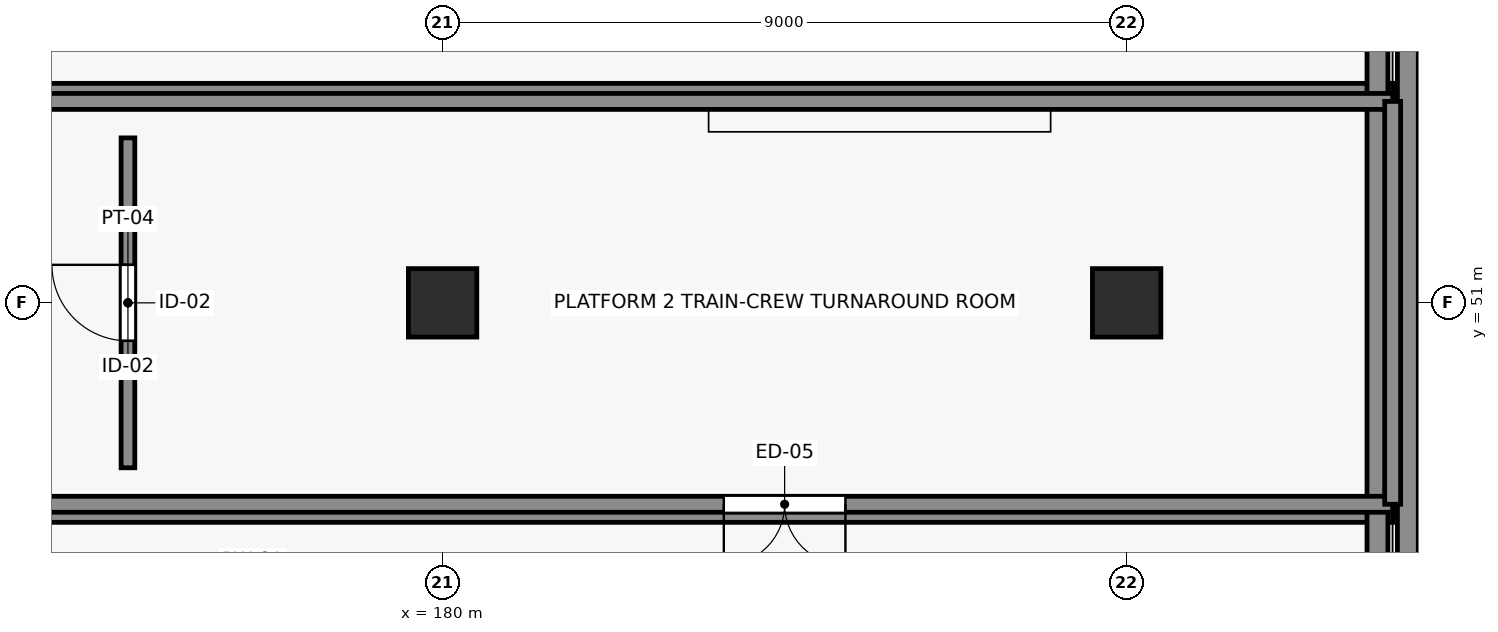
"""IFC4 building model, lengths in metres.
Left out: names, types, materials, properties, quantities, classifications, styles, units other than length and angle.
Written with IfcOpenShell. Run it as: python <this file> out.ifc"""

import sys

from ifc_helpers import new_model, si_unit, direction, frame, frame_2d, origin, origin_2d, place, context, subcontext, project, spatial, rectangle, extrude, element, fill, save


model = new_model("IFC4")
c1 = context("Model", 3, precision=1e-05, world=origin(), true_north=direction((0.0, 1.0)))
c2 = subcontext(c1, "Body", "Model", "MODEL_VIEW")
j1 = project(units=[si_unit("LENGTHUNIT", "METRE"), si_unit("PLANEANGLEUNIT", "RADIAN")], contexts=[c1])
p1 = place(None, origin())
s1 = spatial("IfcSite", under=j1, at=p1, CompositionType="ELEMENT")
p2 = place(p1, origin())
s2 = spatial("IfcBuilding", under=s1, at=p2, CompositionType="ELEMENT")
p3 = place(p2, origin())
s3 = spatial("IfcBuildingStorey", under=s2, at=p3, CompositionType="ELEMENT", Elevation=0.0)
for number, where, z_axis, x_axis in (
    (1, (141.5, 48.25, 0.0), (0.0, 0.0, 1.0), (1.0, 0.0, 0.0)),
    (2, (141.5, 53.75, 0.0), (0.0, 0.0, 1.0), (1.0, 0.0, 0.0)),
):
    element("IfcWall", number, at=place(p3, frame(where, z_axis=z_axis, x_axis=x_axis)), inside=s3, PredefinedType="SOLIDWALL", context=c2, shape_type="SweptSolid", body=[
        extrude(rectangle(XDim=51.0, YDim=0.275, at=frame_2d((25.5, 0.0))), origin(), (0.0, 0.0, 1.0), 0.675),
    ])
for number, where, z_axis, x_axis in (
    (3, (192.3, 47.25, 0.0), (0.0, 0.0, 1.0), (0.0, 1.0, 0.0)),
    (4, (192.7, 47.25, 0.0), (0.0, 0.0, 1.0), (0.0, 1.0, 0.0)),
):
    element("IfcWall", number, at=place(p3, frame(where, z_axis=z_axis, x_axis=x_axis)), inside=s3, PredefinedType="SOLIDWALL", context=c2, shape_type="SweptSolid", body=[
        extrude(rectangle(XDim=7.5, YDim=0.275, at=frame_2d((3.75, 0.0))), origin(), (0.0, 0.0, 1.0), 0.675),
    ])
for number, where, z_axis, x_axis in (
    (5, (180.0, 51.0, 0.0), (0.0, 0.0, 1.0), (1.0, 0.0, 0.0)),
    (6, (189.0, 51.0, 0.0), (0.0, 0.0, 1.0), (1.0, 0.0, 0.0)),
):
    element("IfcColumn", number, at=place(p3, frame(where, z_axis=z_axis, x_axis=x_axis)), inside=s3, PredefinedType="COLUMN", context=c2, shape_type="SweptSolid", body=[
        extrude(rectangle(XDim=0.9, YDim=0.9, at=origin_2d()), origin(), (0.0, 0.0, 1.0), 4.8),
    ])
p4 = place(p3, frame((192.5, 48.35, 0.915), z_axis=(0.0, 0.0, 1.0), x_axis=(-1.0, 0.0, 0.0)))
e7 = element("IfcWall", 7, at=p4, inside=s3, PredefinedType="SOLIDWALL", context=c2, shape_type="SweptSolid", body=[
    extrude(rectangle(XDim=51.0, YDim=0.21, at=frame_2d((25.5, 0.0))), origin(), (0.0, 0.0, 1.0), 3.185),
])
p5 = place(p4, frame((25.2, 0.0, 0.0)))
e8 = element("IfcOpeningElement", 8, at=p5, cuts=e7, PredefinedType="OPENING", context=c2, shape_type="SweptSolid", body=[
    extrude(rectangle(XDim=1.6, YDim=2.3, at=frame_2d((0.8, 1.15))), frame((0.0, 0.115, 0.0), z_axis=(0.0, -1.0, 0.0), x_axis=(1.0, 0.0, 0.0)), (0.0, 0.0, 1.0), 0.23),
])
p6 = place(p4, frame((7.2, 0.0, 0.0)))
e9 = element("IfcOpeningElement", 9, at=p6, cuts=e7, PredefinedType="OPENING", context=c2, shape_type="SweptSolid", body=[
    extrude(rectangle(XDim=1.6, YDim=2.3, at=frame_2d((0.8, 1.15))), frame((0.0, 0.115, 0.0), z_axis=(0.0, -1.0, 0.0), x_axis=(1.0, 0.0, 0.0)), (0.0, 0.0, 1.0), 0.23),
])
p7 = place(p4, frame((36.0, 0.0, 0.9)))
e10 = element("IfcOpeningElement", 10, at=p7, cuts=e7, PredefinedType="OPENING", context=c2, shape_type="SweptSolid", body=[
    extrude(rectangle(XDim=4.2, YDim=1.5, at=frame_2d((2.1, 0.75))), frame((0.0, 0.115, 0.0), z_axis=(0.0, -1.0, 0.0), x_axis=(1.0, 0.0, 0.0)), (0.0, 0.0, 1.0), 0.23),
])
p8 = place(p3, frame((141.5, 53.65, 0.915), z_axis=(0.0, 0.0, 1.0), x_axis=(1.0, 0.0, 0.0)))
e11 = element("IfcWall", 11, at=p8, inside=s3, PredefinedType="SOLIDWALL", context=c2, shape_type="SweptSolid", body=[
    extrude(rectangle(XDim=51.0, YDim=0.21, at=frame_2d((25.5, 0.0))), origin(), (0.0, 0.0, 1.0), 3.185),
])
p9 = place(p8, frame((15.2, 0.0, 0.0)))
e12 = element("IfcOpeningElement", 12, at=p9, cuts=e11, PredefinedType="OPENING", context=c2, shape_type="SweptSolid", body=[
    extrude(rectangle(XDim=1.6, YDim=2.3, at=frame_2d((0.8, 1.15))), frame((0.0, 0.115, 0.0), z_axis=(0.0, -1.0, 0.0), x_axis=(1.0, 0.0, 0.0)), (0.0, 0.0, 1.0), 0.23),
])
p10 = place(p8, frame((24.0, 0.0, 0.9)))
e13 = element("IfcOpeningElement", 13, at=p10, cuts=e11, PredefinedType="OPENING", context=c2, shape_type="SweptSolid", body=[
    extrude(rectangle(XDim=4.2, YDim=1.5, at=frame_2d((2.1, 0.75))), frame((0.0, 0.115, 0.0), z_axis=(0.0, -1.0, 0.0), x_axis=(1.0, 0.0, 0.0)), (0.0, 0.0, 1.0), 0.23),
])
p11 = place(p3, frame((192.5, 53.65, 0.915), z_axis=(0.0, 0.0, 1.0), x_axis=(0.0, -1.0, 0.0)))
e14 = element("IfcWall", 14, at=p11, inside=s3, PredefinedType="SOLIDWALL", context=c2, shape_type="SweptSolid", body=[
    extrude(rectangle(XDim=5.3, YDim=0.21, at=frame_2d((2.65, 0.0))), origin(), (0.0, 0.0, 1.0), 3.185),
])
p12 = place(p3, frame((175.86, 48.83, 0.915), z_axis=(0.0, 0.0, 1.0), x_axis=(0.0, 1.0, 0.0)))
e15 = element("IfcWall", 15, at=p12, inside=s3, PredefinedType="PARTITIONING", context=c2, shape_type="SweptSolid", body=[
    extrude(rectangle(XDim=4.34, YDim=0.18, at=frame_2d((2.17, 0.0))), origin(), (0.0, 0.0, 1.0), 3.435),
])
p13 = place(p12, frame((1.67, 0.0, 0.0)))
e16 = element("IfcOpeningElement", 16, at=p13, cuts=e15, PredefinedType="OPENING", context=c2, shape_type="SweptSolid", body=[
    extrude(rectangle(XDim=1.0, YDim=2.15, at=frame_2d((0.5, 1.075))), frame((0.0, 0.1, 0.0), z_axis=(0.0, -1.0, 0.0), x_axis=(1.0, 0.0, 0.0)), (0.0, 0.0, 1.0), 0.2),
])
p14 = place(p6, origin())
e17 = element("IfcDoor", 17, at=p14, inside=s3, OperationType="DOUBLE_DOOR_SINGLE_SWING", PredefinedType="DOOR", context=c2, shape_type="SweptSolid", body=[
    extrude(rectangle(XDim=1.6, YDim=2.3, at=frame_2d((0.8, 1.15))), frame((0.0, 0.025, 0.0), z_axis=(0.0, -1.0, 0.0), x_axis=(1.0, 0.0, 0.0)), (0.0, 0.0, 1.0), 0.05),
])
fill(e9, e17)
p15 = place(p13, origin())
e18 = element("IfcDoor", 18, at=p15, inside=s3, OperationType="SINGLE_SWING_RIGHT", PredefinedType="DOOR", context=c2, shape_type="SweptSolid", body=[
    extrude(rectangle(XDim=1.0, YDim=2.15, at=frame_2d((0.5, 1.075))), frame((0.0, 0.025, 0.0), z_axis=(0.0, -1.0, 0.0), x_axis=(1.0, 0.0, 0.0)), (0.0, 0.0, 1.0), 0.05),
])
fill(e16, e18)
save(model, sys.argv[1])
